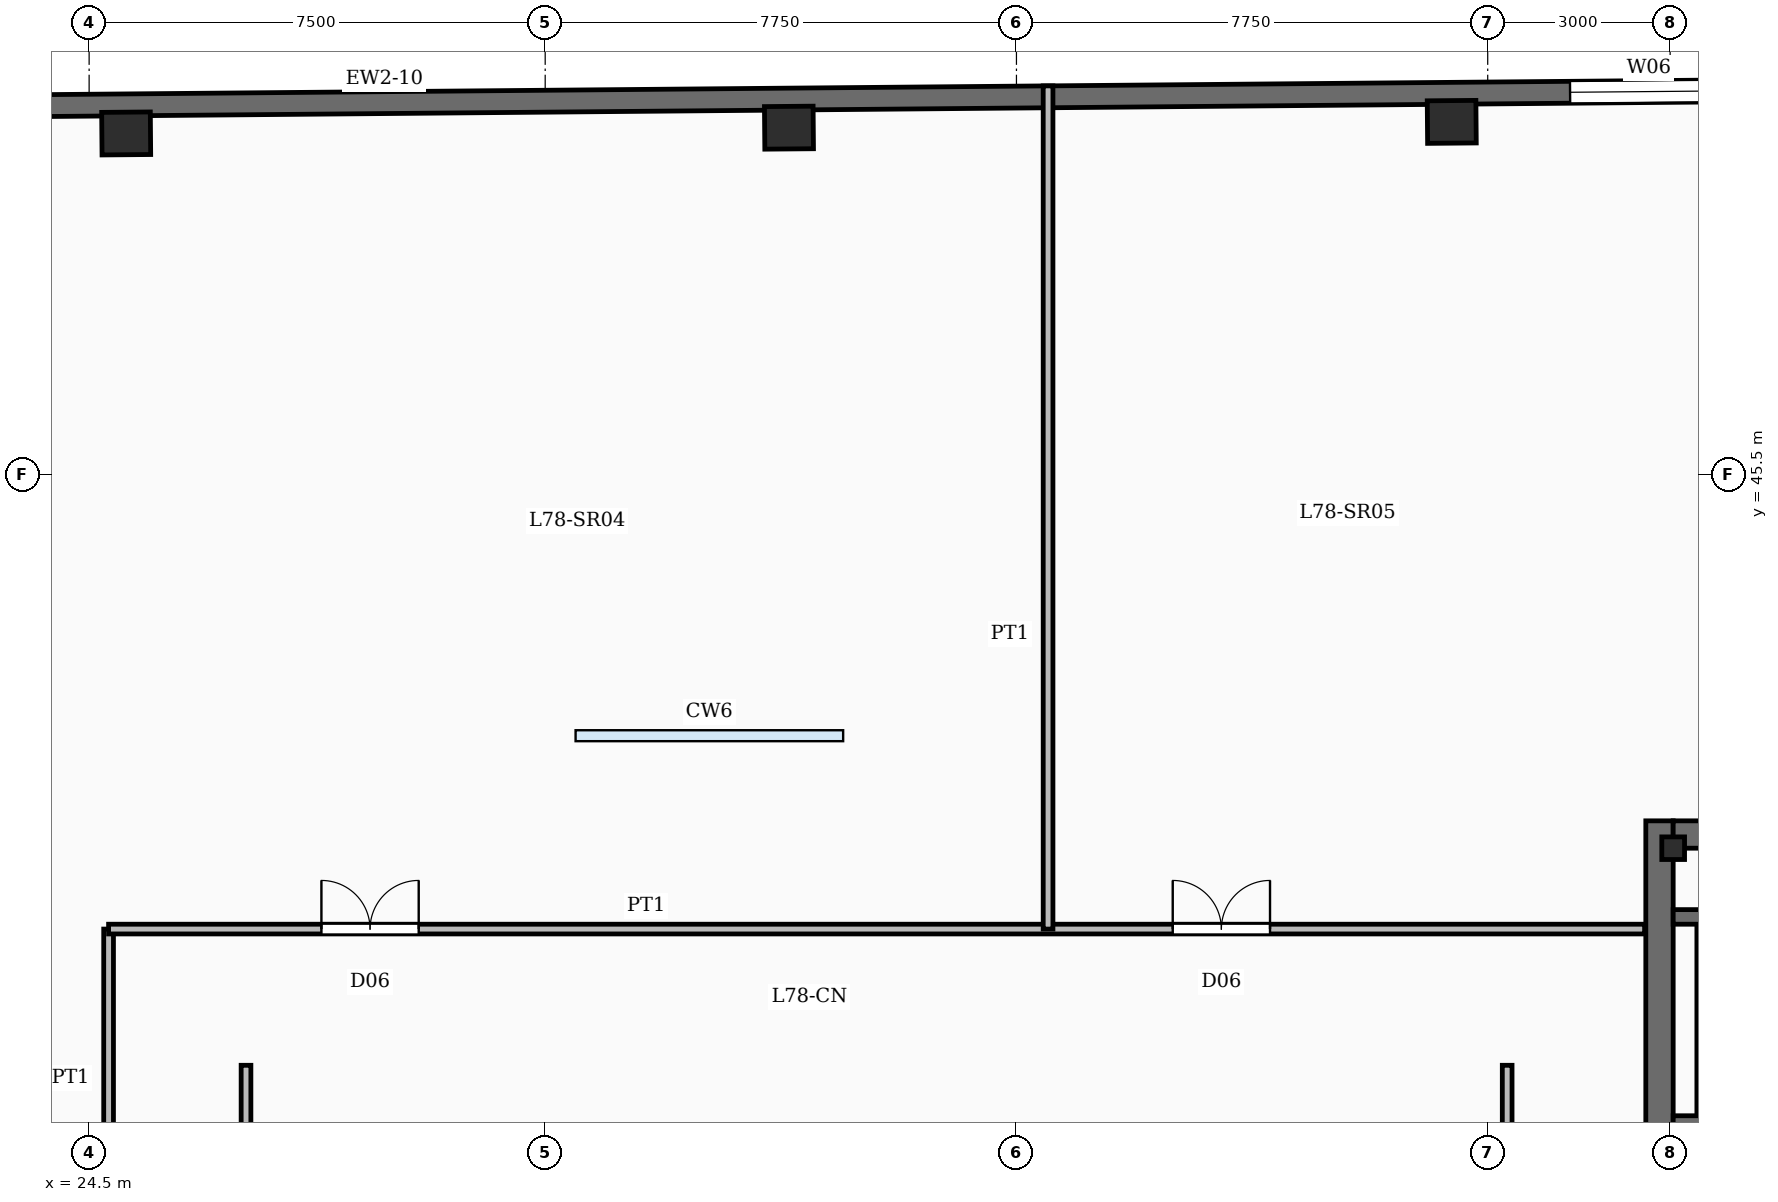
"""IFC4 building model, lengths in metres.
Left out: names, types, materials, properties, quantities, classifications, styles, units other than length and angle.
Written with IfcOpenShell. Run it as: python <this file> out.ifc"""

import sys

from ifc_helpers import new_model, si_unit, direction, frame, frame_2d, origin, origin_2d, place, context, subcontext, project, spatial, rectangle, i_section, extrude, element, fill, save


model = new_model("IFC4")
c1 = context("Model", 3, precision=1e-05, world=origin(), true_north=direction((0.0, 1.0)))
c2 = subcontext(c1, "Body", "Model", "MODEL_VIEW")
j1 = project(units=[si_unit("LENGTHUNIT", "METRE"), si_unit("PLANEANGLEUNIT", "RADIAN")], contexts=[c1])
p1 = place(None, origin())
s1 = spatial("IfcSite", under=j1, at=p1, CompositionType="ELEMENT")
p2 = place(p1, origin())
s2 = spatial("IfcBuilding", under=s1, at=p2, CompositionType="ELEMENT")
p3 = place(p2, frame((0.0, 0.0, 317.2)))
s3 = spatial("IfcBuildingStorey", under=s2, at=p3, CompositionType="ELEMENT", Elevation=317.2)
p4 = place(p3, frame((50.325, 19.0, -0.24), z_axis=(0.0, 0.0, 1.0), x_axis=(0.0, 1.0, 0.0)))
e1 = element("IfcWall", 1, at=p4, inside=s3, PredefinedType="SHEAR", context=c2, shape_type="SweptSolid", body=[
    extrude(rectangle(XDim=20.8, YDim=0.45, at=frame_2d((10.4, 0.0))), origin(), (0.0, 0.0, 1.0), 4.62),
])
p5 = place(p4, frame((2.5, 0.0, 0.24)))
e2 = element("IfcOpeningElement", 2, at=p5, cuts=e1, PredefinedType="OPENING", context=c2, shape_type="SweptSolid", body=[
    extrude(rectangle(XDim=1.05, YDim=2.15, at=frame_2d((0.525, 1.075))), frame((0.0, 0.235, 0.0), z_axis=(0.0, -1.0, 0.0), x_axis=(1.0, 0.0, 0.0)), (0.0, 0.0, 1.0), 0.47),
])
p6 = place(p4, frame((8.65, 0.0, 0.24)))
e3 = element("IfcOpeningElement", 3, at=p6, cuts=e1, PredefinedType="OPENING", context=c2, shape_type="SweptSolid", body=[
    extrude(rectangle(XDim=1.05, YDim=2.15, at=frame_2d((0.525, 1.075))), frame((0.0, 0.235, 0.0), z_axis=(0.0, -1.0, 0.0), x_axis=(1.0, 0.0, 0.0)), (0.0, 0.0, 1.0), 0.47),
])
p7 = place(p4, frame((14.62, 0.0, 0.24)))
e4 = element("IfcOpeningElement", 4, at=p7, cuts=e1, PredefinedType="OPENING", context=c2, shape_type="SweptSolid", body=[
    extrude(rectangle(XDim=1.1, YDim=2.15, at=frame_2d((0.55, 1.075))), frame((0.0, 0.235, 0.0), z_axis=(0.0, -1.0, 0.0), x_axis=(1.0, 0.0, 0.0)), (0.0, 0.0, 1.0), 0.47),
])
p8 = place(p3, frame((50.55, 39.575, -0.24), z_axis=(0.0, 0.0, 1.0), x_axis=(1.0, 0.0, 0.0)))
e5 = element("IfcWall", 5, at=p8, inside=s3, PredefinedType="SHEAR", context=c2, shape_type="SweptSolid", body=[
    extrude(rectangle(XDim=9.8, YDim=0.45, at=frame_2d((4.9, 0.0))), origin(), (0.0, 0.0, 1.0), 4.62),
])
p9 = place(p3, frame((50.55, 39.35, -0.24), z_axis=(0.0, 0.0, 1.0), x_axis=(1.0, 0.0, 0.0)))
e6 = element("IfcColumn", 6, at=p9, inside=s3, PredefinedType="COLUMN", context=c2, shape_type="SweptSolid", body=[
    extrude(i_section(OverallWidth=0.374, OverallDepth=0.372, WebThickness=0.016, FlangeThickness=0.026, FilletRadius=0.02, at=origin_2d()), origin(), (0.0, 0.0, 1.0), 4.62),
])
for number, where, z_axis, x_axis in (
    (7, (46.908, 51.294, -0.24), (0.0, 0.0, 1.0), (1.0, 0.009, 0.0)),
    (8, (36.009, 51.199, -0.24), (0.0, 0.0, 1.0), (1.0, 0.009, 0.0)),
    (9, (25.109, 51.104, -0.24), (0.0, 0.0, 1.0), (1.0, 0.009, 0.0)),
):
    element("IfcColumn", number, at=place(p3, frame(where, z_axis=z_axis, x_axis=x_axis)), inside=s3, PredefinedType="COLUMN", context=c2, shape_type="SweptSolid", body=[
        extrude(rectangle(XDim=0.8, YDim=0.7, at=origin_2d()), origin(), (0.0, 0.0, 1.0), 4.62),
    ])
p10 = place(p3, frame((13.856, 51.476, 0.0), z_axis=(0.0, 0.0, 1.0), x_axis=(0.999961944954, 0.008724026757, 0.0)))
e10 = element("IfcWall", 10, at=p10, inside=s3, PredefinedType="SOLIDWALL", context=c2, shape_type="SweptSolid", body=[
    extrude(rectangle(XDim=44.3, YDim=0.36, at=frame_2d((22.15, 0.0))), origin(), (0.0, 0.0, 1.0), 4.38),
])
p11 = place(p10, frame((2.6, 0.0, 0.8)))
e11 = element("IfcOpeningElement", 11, at=p11, cuts=e10, PredefinedType="OPENING", context=c2, shape_type="SweptSolid", body=[
    extrude(rectangle(XDim=2.6, YDim=3.2, at=frame_2d((1.3, 1.6))), frame((0.0, 0.19, 0.0), z_axis=(0.0, -1.0, 0.0), x_axis=(1.0, 0.0, 0.0)), (0.0, 0.0, 1.0), 0.38),
])
p12 = place(p10, frame((35.0, 0.0, 0.8)))
e12 = element("IfcOpeningElement", 12, at=p12, cuts=e10, PredefinedType="OPENING", context=c2, shape_type="SweptSolid", body=[
    extrude(rectangle(XDim=2.6, YDim=3.2, at=frame_2d((1.3, 1.6))), frame((0.0, 0.19, 0.0), z_axis=(0.0, -1.0, 0.0), x_axis=(1.0, 0.0, 0.0)), (0.0, 0.0, 1.0), 0.38),
])
p13 = place(p3, frame((60.35, 34.83, 0.0), z_axis=(0.0, 0.0, 1.0), x_axis=(-1.0, 0.0, 0.0)))
e13 = element("IfcWall", 13, at=p13, inside=s3, PredefinedType="SOLIDWALL", context=c2, shape_type="SweptSolid", body=[
    extrude(rectangle(XDim=9.8, YDim=0.24, at=frame_2d((4.9, 0.0))), origin(), (0.0, 0.0, 1.0), 4.38),
])
p14 = place(p13, frame((7.87, 0.0, 0.0)))
e14 = element("IfcOpeningElement", 14, at=p14, cuts=e13, PredefinedType="OPENING", context=c2, shape_type="SweptSolid", body=[
    extrude(rectangle(XDim=1.1, YDim=2.15, at=frame_2d((0.55, 1.075))), frame((0.0, 0.13, 0.0), z_axis=(0.0, -1.0, 0.0), x_axis=(1.0, 0.0, 0.0)), (0.0, 0.0, 1.0), 0.26),
])
p15 = place(p3, frame((50.55, 38.22, 0.0), z_axis=(0.0, 0.0, 1.0), x_axis=(1.0, 0.0, 0.0)))
e15 = element("IfcWall", 15, at=p15, inside=s3, PredefinedType="SOLIDWALL", context=c2, shape_type="SweptSolid", body=[
    extrude(rectangle(XDim=9.8, YDim=0.24, at=frame_2d((4.9, 0.0))), origin(), (0.0, 0.0, 1.0), 4.38),
])
p16 = place(p3, frame((51.06, 34.95, 0.0), z_axis=(0.0, 0.0, 1.0), x_axis=(0.0, 1.0, 0.0)))
e16 = element("IfcWall", 16, at=p16, inside=s3, PredefinedType="SOLIDWALL", context=c2, shape_type="SweptSolid", body=[
    extrude(rectangle(XDim=3.15, YDim=0.24, at=frame_2d((1.575, 0.0))), origin(), (0.0, 0.0, 1.0), 4.38),
])
for number, where, z_axis, x_axis in (
    (17, (27.08, 15.38, 0.0), (0.0, 0.0, 1.0), (0.0, 1.0, 0.0)),
    (18, (47.82, 15.38, 0.0), (0.0, 0.0, 1.0), (0.0, 1.0, 0.0)),
):
    element("IfcWall", number, at=place(p3, frame(where, z_axis=z_axis, x_axis=x_axis)), inside=s3, PredefinedType="PARTITIONING", context=c2, shape_type="SweptSolid", body=[
        extrude(rectangle(XDim=20.4, YDim=0.16, at=frame_2d((10.2, 0.0))), origin(), (0.0, 0.0, 1.0), 3.44),
    ])
p17 = place(p3, frame((24.82, 34.25, 0.0), z_axis=(0.0, 0.0, 1.0), x_axis=(0.0, 1.0, 0.0)))
e19 = element("IfcWall", 19, at=p17, inside=s3, PredefinedType="PARTITIONING", context=c2, shape_type="SweptSolid", body=[
    extrude(rectangle(XDim=3.77, YDim=0.16, at=frame_2d((1.885, 0.0))), origin(), (0.0, 0.0, 1.0), 3.44),
])
p18 = place(p3, frame((24.82, 38.02, 0.0), z_axis=(0.0, 0.0, 1.0), x_axis=(1.0, 0.0, 0.0)))
e20 = element("IfcWall", 20, at=p18, inside=s3, PredefinedType="PARTITIONING", context=c2, shape_type="SweptSolid", body=[
    extrude(rectangle(XDim=25.26, YDim=0.16, at=frame_2d((12.63, 0.0))), origin(), (0.0, 0.0, 1.0), 3.44),
])
p19 = place(p18, frame((3.5, 0.0, 0.0)))
e21 = element("IfcOpeningElement", 21, at=p19, cuts=e20, PredefinedType="OPENING", context=c2, shape_type="SweptSolid", body=[
    extrude(rectangle(XDim=1.6, YDim=2.15, at=frame_2d((0.8, 1.075))), frame((0.0, 0.09, 0.0), z_axis=(0.0, -1.0, 0.0), x_axis=(1.0, 0.0, 0.0)), (0.0, 0.0, 1.0), 0.18),
])
p20 = place(p18, frame((17.5, 0.0, 0.0)))
e22 = element("IfcOpeningElement", 22, at=p20, cuts=e20, PredefinedType="OPENING", context=c2, shape_type="SweptSolid", body=[
    extrude(rectangle(XDim=1.6, YDim=2.15, at=frame_2d((0.8, 1.075))), frame((0.0, 0.09, 0.0), z_axis=(0.0, -1.0, 0.0), x_axis=(1.0, 0.0, 0.0)), (0.0, 0.0, 1.0), 0.18),
])
p21 = place(p3, frame((40.27, 38.02, 0.0), z_axis=(0.0, 0.0, 1.0), x_axis=(0.0, 1.0, 0.0)))
e23 = element("IfcWall", 23, at=p21, inside=s3, PredefinedType="PARTITIONING", context=c2, shape_type="SweptSolid", body=[
    extrude(rectangle(XDim=13.866, YDim=0.16, at=frame_2d((6.933, 0.0))), origin(), (0.0, 0.0, 1.0), 3.44),
])
p22 = place(p12, origin())
e24 = element("IfcWindow", 24, at=p22, inside=s3, PartitioningType="DOUBLE_PANEL_VERTICAL", PredefinedType="WINDOW", context=c2, shape_type="SweptSolid", body=[
    extrude(rectangle(XDim=2.6, YDim=3.2, at=frame_2d((1.3, 1.6))), frame((0.0, 0.03, 0.0), z_axis=(0.0, -1.0, 0.0), x_axis=(1.0, 0.0, 0.0)), (0.0, 0.0, 1.0), 0.06),
])
fill(e12, e24)
p23 = place(p19, origin())
e25 = element("IfcDoor", 25, at=p23, inside=s3, OperationType="DOUBLE_DOOR_SINGLE_SWING", PredefinedType="DOOR", context=c2, shape_type="SweptSolid", body=[
    extrude(rectangle(XDim=1.6, YDim=2.15, at=frame_2d((0.8, 1.075))), frame((0.0, 0.025, 0.0), z_axis=(0.0, -1.0, 0.0), x_axis=(1.0, 0.0, 0.0)), (0.0, 0.0, 1.0), 0.05),
])
fill(e21, e25)
p24 = place(p20, origin())
e26 = element("IfcDoor", 26, at=p24, inside=s3, OperationType="DOUBLE_DOOR_SINGLE_SWING", PredefinedType="DOOR", context=c2, shape_type="SweptSolid", body=[
    extrude(rectangle(XDim=1.6, YDim=2.15, at=frame_2d((0.8, 1.075))), frame((0.0, 0.025, 0.0), z_axis=(0.0, -1.0, 0.0), x_axis=(1.0, 0.0, 0.0)), (0.0, 0.0, 1.0), 0.05),
])
fill(e22, e26)
save(model, sys.argv[1])
